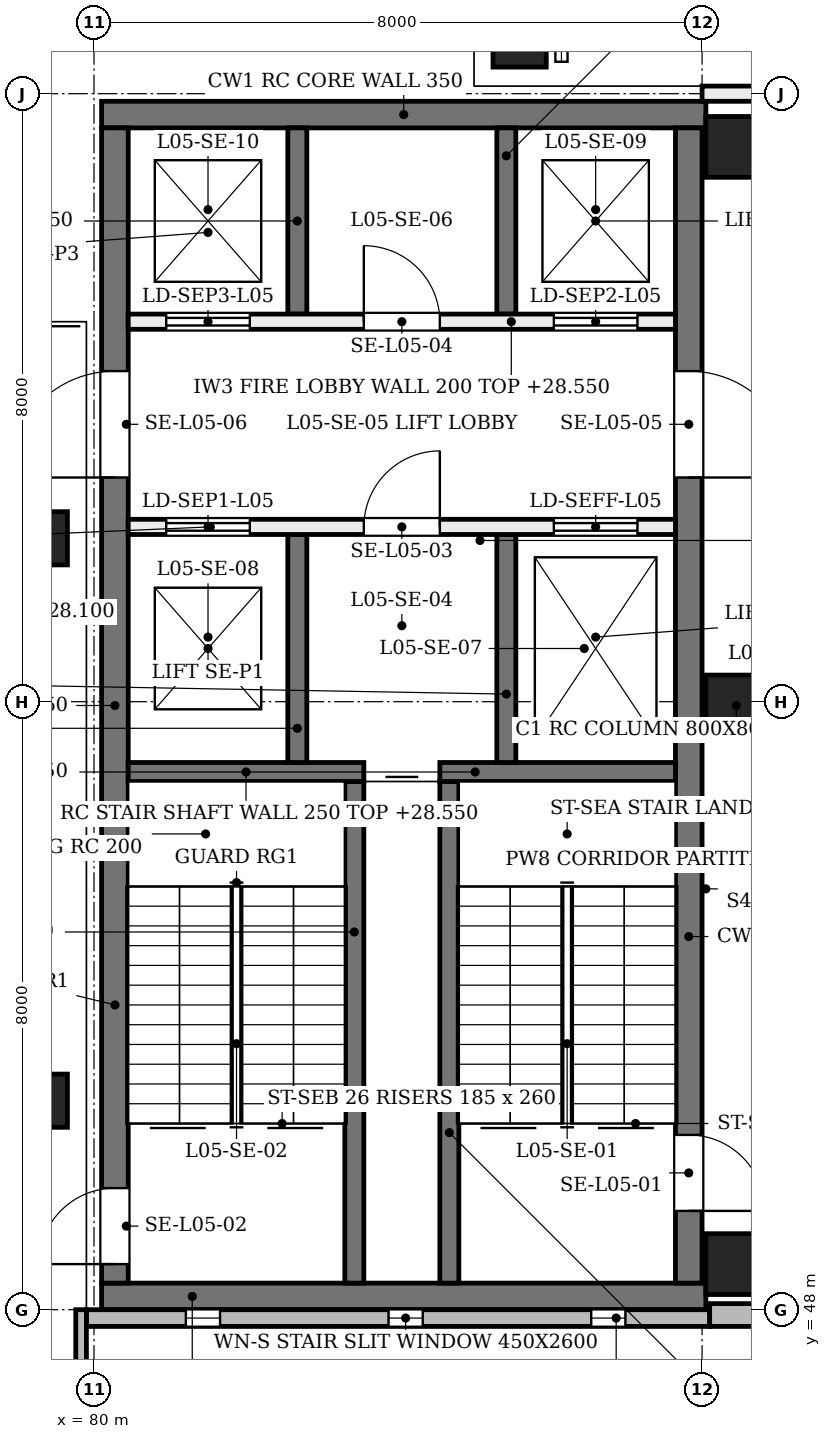
"""IFC4 building model, lengths in metres.
Left out: names, types, materials, properties, quantities, classifications, styles, units other than length and angle.
Written with IfcOpenShell. Run it as: python <this file> out.ifc"""

import sys

from ifc_helpers import new_model, si_unit, direction, frame, frame_2d, origin, origin_2d, place, context, subcontext, project, spatial, rectangle, extrude, element, fill, save


model = new_model("IFC4")
c1 = context("Model", 3, precision=1e-05, world=origin(), true_north=direction((0.0, 1.0)))
c2 = subcontext(c1, "Body", "Model", "MODEL_VIEW")
j1 = project(units=[si_unit("LENGTHUNIT", "METRE"), si_unit("PLANEANGLEUNIT", "RADIAN")], contexts=[c1])
p1 = place(None, origin())
s1 = spatial("IfcSite", under=j1, at=p1, CompositionType="ELEMENT")
p2 = place(p1, origin())
s2 = spatial("IfcBuilding", under=s1, at=p2, CompositionType="ELEMENT")
p3 = place(p2, frame((0.0, 0.0, 24.0)))
s3 = spatial("IfcBuildingStorey", under=s2, at=p3, CompositionType="ELEMENT", Elevation=24.0)
for number, where, z_axis, x_axis in (
    (1, (80.1, 48.175, 0.0), (0.0, 0.0, 1.0), (1.0, 0.0, 0.0)),
    (2, (80.1, 63.725, 0.0), (0.0, 0.0, 1.0), (1.0, 0.0, 0.0)),
):
    element("IfcWall", number, at=place(p3, frame(where, z_axis=z_axis, x_axis=x_axis)), inside=s3, PredefinedType="SHEAR", context=c2, shape_type="SweptSolid", body=[
        extrude(rectangle(XDim=7.95, YDim=0.35, at=frame_2d((3.975, 0.0))), origin(), (0.0, 0.0, 1.0), 4.58),
    ])
p4 = place(p3, frame((80.275, 48.35, 0.0), z_axis=(0.0, 0.0, 1.0), x_axis=(0.0, 1.0, 0.0)))
e3 = element("IfcWall", 3, at=p4, inside=s3, PredefinedType="SHEAR", context=c2, shape_type="SweptSolid", body=[
    extrude(rectangle(XDim=15.2, YDim=0.35, at=frame_2d((7.6, 0.0))), origin(), (0.0, 0.0, 1.0), 4.58),
])
p5 = place(p4, frame((0.25, 0.0, 0.0)))
e4 = element("IfcOpeningElement", 4, at=p5, cuts=e3, PredefinedType="OPENING", context=c2, shape_type="SweptSolid", body=[
    extrude(rectangle(XDim=1.0, YDim=2.1, at=frame_2d((0.5, 1.05))), frame((0.0, 0.185, 0.0), z_axis=(0.0, -1.0, 0.0), x_axis=(1.0, 0.0, 0.0)), (0.0, 0.0, 1.0), 0.37),
])
p6 = place(p4, frame((10.6, 0.0, 0.0)))
e5 = element("IfcOpeningElement", 5, at=p6, cuts=e3, PredefinedType="OPENING", context=c2, shape_type="SweptSolid", body=[
    extrude(rectangle(XDim=1.4, YDim=2.1, at=frame_2d((0.7, 1.05))), frame((0.0, 0.185, 0.0), z_axis=(0.0, -1.0, 0.0), x_axis=(1.0, 0.0, 0.0)), (0.0, 0.0, 1.0), 0.37),
])
p7 = place(p3, frame((87.825, 48.35, 0.0), z_axis=(0.0, 0.0, 1.0), x_axis=(0.0, 1.0, 0.0)))
e6 = element("IfcWall", 6, at=p7, inside=s3, PredefinedType="SHEAR", context=c2, shape_type="SweptSolid", body=[
    extrude(rectangle(XDim=15.2, YDim=0.35, at=frame_2d((7.6, 0.0))), origin(), (0.0, 0.0, 1.0), 4.58),
])
p8 = place(p7, frame((0.95, 0.0, 0.0)))
e7 = element("IfcOpeningElement", 7, at=p8, cuts=e6, PredefinedType="OPENING", context=c2, shape_type="SweptSolid", body=[
    extrude(rectangle(XDim=1.0, YDim=2.1, at=frame_2d((0.5, 1.05))), frame((0.0, 0.185, 0.0), z_axis=(0.0, -1.0, 0.0), x_axis=(1.0, 0.0, 0.0)), (0.0, 0.0, 1.0), 0.37),
])
p9 = place(p7, frame((10.6, 0.0, 0.0)))
e8 = element("IfcOpeningElement", 8, at=p9, cuts=e6, PredefinedType="OPENING", context=c2, shape_type="SweptSolid", body=[
    extrude(rectangle(XDim=1.4, YDim=2.1, at=frame_2d((0.7, 1.05))), frame((0.0, 0.185, 0.0), z_axis=(0.0, -1.0, 0.0), x_axis=(1.0, 0.0, 0.0)), (0.0, 0.0, 1.0), 0.37),
])
for number, where, z_axis, x_axis in (
    (9, (88.45, 48.6, 0.0), (0.0, 0.0, 1.0), (1.0, 0.0, 0.0)),
    (10, (88.45, 55.95, 0.0), (0.0, 0.0, 1.0), (1.0, 0.0, 0.0)),
    (11, (88.45, 63.3, 0.0), (0.0, 0.0, 1.0), (1.0, 0.0, 0.0)),
):
    element("IfcColumn", number, at=place(p3, frame(where, z_axis=z_axis, x_axis=x_axis)), inside=s3, PredefinedType="COLUMN", context=c2, shape_type="SweptSolid", body=[
        extrude(rectangle(XDim=0.8, YDim=0.8, at=origin_2d()), origin(), (0.0, 0.0, 1.0), 4.8),
    ])
for number, where, z_axis, x_axis in (
    (12, (79.3, 51.0, 0.0), (0.0, -0.204, 0.979), (1.0, 0.0, 0.0)),
    (13, (79.3, 58.4, 0.0), (0.0, -0.204, 0.979), (1.0, 0.0, 0.0)),
):
    element("IfcColumn", number, at=place(p3, frame(where, z_axis=z_axis, x_axis=x_axis)), inside=s3, PredefinedType="COLUMN", context=c2, shape_type="SweptSolid", body=[
        extrude(rectangle(XDim=0.7, YDim=0.7, at=origin_2d()), origin(), (0.0, 0.0, 1.0), 4.678),
    ])
p10 = place(p3, frame((85.6, 64.7, 0.0), z_axis=(0.0, 0.0, 1.0), x_axis=(1.0, 0.0, 0.0)))
e14 = element("IfcColumn", 14, at=p10, inside=s3, PredefinedType="COLUMN", context=c2, shape_type="SweptSolid", body=[
    extrude(rectangle(XDim=0.7, YDim=0.7, at=origin_2d()), origin(), (0.0, 0.0, 1.0), 4.58),
])
p11 = place(p3, frame((79.9, 47.89, 0.0), z_axis=(0.0, 0.0, 1.0), x_axis=(1.0, 0.0, 0.0)))
e15 = element("IfcWall", 15, at=p11, inside=s3, PredefinedType="SOLIDWALL", context=c2, shape_type="SweptSolid", body=[
    extrude(rectangle(XDim=8.2, YDim=0.22, at=frame_2d((4.1, 0.0))), origin(), (0.0, 0.0, 1.0), 3.9),
])
p12 = place(p11, frame((1.308, 0.0, 0.9)))
e16 = element("IfcOpeningElement", 16, at=p12, cuts=e15, PredefinedType="OPENING", context=c2, shape_type="SweptSolid", body=[
    extrude(rectangle(XDim=0.45, YDim=2.6, at=frame_2d((0.225, 1.3))), frame((0.0, 0.12, 0.0), z_axis=(0.0, -1.0, 0.0), x_axis=(1.0, 0.0, 0.0)), (0.0, 0.0, 1.0), 0.24),
])
p13 = place(p11, frame((3.975, 0.0, 0.9)))
e17 = element("IfcOpeningElement", 17, at=p13, cuts=e15, PredefinedType="OPENING", context=c2, shape_type="SweptSolid", body=[
    extrude(rectangle(XDim=0.45, YDim=2.6, at=frame_2d((0.225, 1.3))), frame((0.0, 0.12, 0.0), z_axis=(0.0, -1.0, 0.0), x_axis=(1.0, 0.0, 0.0)), (0.0, 0.0, 1.0), 0.24),
])
p14 = place(p11, frame((6.642, 0.0, 0.9)))
e18 = element("IfcOpeningElement", 18, at=p14, cuts=e15, PredefinedType="OPENING", context=c2, shape_type="SweptSolid", body=[
    extrude(rectangle(XDim=0.45, YDim=2.6, at=frame_2d((0.225, 1.3))), frame((0.0, 0.12, 0.0), z_axis=(0.0, -1.0, 0.0), x_axis=(1.0, 0.0, 0.0)), (0.0, 0.0, 1.0), 0.24),
])
p15 = place(p3, frame((88.1, 47.93, 0.0), z_axis=(0.0, 0.0, 1.0), x_axis=(1.0, 0.0, 0.0)))
e19 = element("IfcWall", 19, at=p15, inside=s3, PredefinedType="SOLIDWALL", context=c2, shape_type="SweptSolid", body=[
    extrude(rectangle(XDim=7.9, YDim=0.3, at=frame_2d((3.95, 0.0))), origin(), (0.0, 0.0, 1.0), 3.9),
])
p16 = place(p15, frame((0.717, 0.0, 0.75)))
e20 = element("IfcOpeningElement", 20, at=p16, cuts=e19, PredefinedType="OPENING", context=c2, shape_type="SweptSolid", body=[
    extrude(rectangle(XDim=1.2, YDim=3.1, at=frame_2d((0.6, 1.55))), frame((0.0, 0.16, 0.0), z_axis=(0.0, -1.0, 0.0), x_axis=(1.0, 0.0, 0.0)), (0.0, 0.0, 1.0), 0.32),
])
p17 = place(p15, frame((3.35, 0.0, 0.75)))
e21 = element("IfcOpeningElement", 21, at=p17, cuts=e19, PredefinedType="OPENING", context=c2, shape_type="SweptSolid", body=[
    extrude(rectangle(XDim=1.2, YDim=3.1, at=frame_2d((0.6, 1.55))), frame((0.0, 0.16, 0.0), z_axis=(0.0, -1.0, 0.0), x_axis=(1.0, 0.0, 0.0)), (0.0, 0.0, 1.0), 0.32),
])
p18 = place(p15, frame((5.983, 0.0, 0.75)))
e22 = element("IfcOpeningElement", 22, at=p18, cuts=e19, PredefinedType="OPENING", context=c2, shape_type="SweptSolid", body=[
    extrude(rectangle(XDim=1.2, YDim=3.1, at=frame_2d((0.6, 1.55))), frame((0.0, 0.16, 0.0), z_axis=(0.0, -1.0, 0.0), x_axis=(1.0, 0.0, 0.0)), (0.0, 0.0, 1.0), 0.32),
])
p19 = place(p3, frame((79.83, 43.0, 0.0), z_axis=(0.0, 0.0, 1.0), x_axis=(0.0, 1.0, 0.0)))
e23 = element("IfcWall", 23, at=p19, inside=s3, PredefinedType="SOLIDWALL", context=c2, shape_type="SweptSolid", body=[
    extrude(rectangle(XDim=5.0, YDim=0.14, at=frame_2d((2.5, 0.0))), origin(), (0.0, 0.0, 1.0), 3.9),
])
for number, where, z_axis, x_axis in (
    (24, (84.675, 48.35, 0.0), (0.0, 0.0, 1.0), (0.0, 1.0, 0.0)),
    (25, (83.425, 48.35, 0.0), (0.0, 0.0, 1.0), (0.0, 1.0, 0.0)),
):
    element("IfcWall", number, at=place(p3, frame(where, z_axis=z_axis, x_axis=x_axis)), inside=s3, PredefinedType="SOLIDWALL", context=c2, shape_type="SweptSolid", body=[
        extrude(rectangle(XDim=6.6, YDim=0.25, at=frame_2d((3.3, 0.0))), origin(), (0.0, 0.0, 1.0), 4.55),
    ])
p20 = place(p3, frame((87.65, 55.075, 0.0), z_axis=(0.0, 0.0, 1.0), x_axis=(-1.0, 0.0, 0.0)))
e26 = element("IfcWall", 26, at=p20, inside=s3, PredefinedType="SOLIDWALL", context=c2, shape_type="SweptSolid", body=[
    extrude(rectangle(XDim=3.1, YDim=0.25, at=frame_2d((1.55, 0.0))), origin(), (0.0, 0.0, 1.0), 4.55),
])
p21 = place(p3, frame((83.55, 55.075, 0.0), z_axis=(0.0, 0.0, 1.0), x_axis=(-1.0, 0.0, 0.0)))
e27 = element("IfcWall", 27, at=p21, inside=s3, PredefinedType="SOLIDWALL", context=c2, shape_type="SweptSolid", body=[
    extrude(rectangle(XDim=3.1, YDim=0.25, at=frame_2d((1.55, 0.0))), origin(), (0.0, 0.0, 1.0), 4.55),
])
p22 = place(p3, frame((85.425, 55.2, 0.0), z_axis=(0.0, 0.0, 1.0), x_axis=(0.0, 1.0, 0.0)))
e28 = element("IfcWall", 28, at=p22, inside=s3, PredefinedType="SOLIDWALL", context=c2, shape_type="SweptSolid", body=[
    extrude(rectangle(XDim=3.0, YDim=0.25, at=frame_2d((1.5, 0.0))), origin(), (0.0, 0.0, 1.0), 4.55),
])
p23 = place(p3, frame((85.425, 61.1, 0.0), z_axis=(0.0, 0.0, 1.0), x_axis=(0.0, 1.0, 0.0)))
e29 = element("IfcWall", 29, at=p23, inside=s3, PredefinedType="SOLIDWALL", context=c2, shape_type="SweptSolid", body=[
    extrude(rectangle(XDim=2.45, YDim=0.25, at=frame_2d((1.225, 0.0))), origin(), (0.0, 0.0, 1.0), 4.55),
])
p24 = place(p3, frame((82.675, 55.2, 0.0), z_axis=(0.0, 0.0, 1.0), x_axis=(0.0, 1.0, 0.0)))
e30 = element("IfcWall", 30, at=p24, inside=s3, PredefinedType="SOLIDWALL", context=c2, shape_type="SweptSolid", body=[
    extrude(rectangle(XDim=3.0, YDim=0.25, at=frame_2d((1.5, 0.0))), origin(), (0.0, 0.0, 1.0), 4.55),
])
p25 = place(p3, frame((82.675, 61.1, 0.0), z_axis=(0.0, 0.0, 1.0), x_axis=(0.0, 1.0, 0.0)))
e31 = element("IfcWall", 31, at=p25, inside=s3, PredefinedType="SOLIDWALL", context=c2, shape_type="SweptSolid", body=[
    extrude(rectangle(XDim=2.45, YDim=0.25, at=frame_2d((1.225, 0.0))), origin(), (0.0, 0.0, 1.0), 4.55),
])
p26 = place(p3, frame((87.65, 58.3, 0.0), z_axis=(0.0, 0.0, 1.0), x_axis=(-1.0, 0.0, 0.0)))
e32 = element("IfcWall", 32, at=p26, inside=s3, PredefinedType="SOLIDWALL", context=c2, shape_type="SweptSolid", body=[
    extrude(rectangle(XDim=7.2, YDim=0.2, at=frame_2d((3.6, 0.0))), origin(), (0.0, 0.0, 1.0), 4.55),
])
p27 = place(p26, frame((0.5, 0.0, 0.0)))
e33 = element("IfcOpeningElement", 33, at=p27, cuts=e32, PredefinedType="OPENING", context=c2, shape_type="SweptSolid", body=[
    extrude(rectangle(XDim=1.1, YDim=2.1, at=frame_2d((0.55, 1.05))), frame((0.0, 0.11, 0.0), z_axis=(0.0, -1.0, 0.0), x_axis=(1.0, 0.0, 0.0)), (0.0, 0.0, 1.0), 0.22),
])
p28 = place(p26, frame((5.6, 0.0, 0.0)))
e34 = element("IfcOpeningElement", 34, at=p28, cuts=e32, PredefinedType="OPENING", context=c2, shape_type="SweptSolid", body=[
    extrude(rectangle(XDim=1.1, YDim=2.1, at=frame_2d((0.55, 1.05))), frame((0.0, 0.11, 0.0), z_axis=(0.0, -1.0, 0.0), x_axis=(1.0, 0.0, 0.0)), (0.0, 0.0, 1.0), 0.22),
])
p29 = place(p26, frame((3.1, 0.0, 0.0)))
e35 = element("IfcOpeningElement", 35, at=p29, cuts=e32, PredefinedType="OPENING", context=c2, shape_type="SweptSolid", body=[
    extrude(rectangle(XDim=1.0, YDim=2.1, at=frame_2d((0.5, 1.05))), frame((0.0, 0.11, 0.0), z_axis=(0.0, -1.0, 0.0), x_axis=(1.0, 0.0, 0.0)), (0.0, 0.0, 1.0), 0.22),
])
p30 = place(p3, frame((87.65, 61.0, 0.0), z_axis=(0.0, 0.0, 1.0), x_axis=(-1.0, 0.0, 0.0)))
e36 = element("IfcWall", 36, at=p30, inside=s3, PredefinedType="SOLIDWALL", context=c2, shape_type="SweptSolid", body=[
    extrude(rectangle(XDim=7.2, YDim=0.2, at=frame_2d((3.6, 0.0))), origin(), (0.0, 0.0, 1.0), 4.55),
])
p31 = place(p30, frame((0.5, 0.0, 0.0)))
e37 = element("IfcOpeningElement", 37, at=p31, cuts=e36, PredefinedType="OPENING", context=c2, shape_type="SweptSolid", body=[
    extrude(rectangle(XDim=1.1, YDim=2.1, at=frame_2d((0.55, 1.05))), frame((0.0, 0.11, 0.0), z_axis=(0.0, -1.0, 0.0), x_axis=(1.0, 0.0, 0.0)), (0.0, 0.0, 1.0), 0.22),
])
p32 = place(p30, frame((5.6, 0.0, 0.0)))
e38 = element("IfcOpeningElement", 38, at=p32, cuts=e36, PredefinedType="OPENING", context=c2, shape_type="SweptSolid", body=[
    extrude(rectangle(XDim=1.1, YDim=2.1, at=frame_2d((0.55, 1.05))), frame((0.0, 0.11, 0.0), z_axis=(0.0, -1.0, 0.0), x_axis=(1.0, 0.0, 0.0)), (0.0, 0.0, 1.0), 0.22),
])
p33 = place(p30, frame((3.1, 0.0, 0.0)))
e39 = element("IfcOpeningElement", 39, at=p33, cuts=e36, PredefinedType="OPENING", context=c2, shape_type="SweptSolid", body=[
    extrude(rectangle(XDim=1.0, YDim=2.1, at=frame_2d((0.5, 1.05))), frame((0.0, 0.11, 0.0), z_axis=(0.0, -1.0, 0.0), x_axis=(1.0, 0.0, 0.0)), (0.0, 0.0, 1.0), 0.22),
])
p34 = place(p3, frame((88.0, 64.0, 0.0), z_axis=(0.0, 0.0, 1.0), x_axis=(1.0, 0.0, 0.0)))
e40 = element("IfcWall", 40, at=p34, inside=s3, PredefinedType="PARTITIONING", context=c2, shape_type="SweptSolid", body=[
    extrude(rectangle(XDim=3.6, YDim=0.2, at=frame_2d((1.8, 0.0))), origin(), (0.0, 0.0, 1.0), 3.88),
])
p35 = place(p34, frame((1.0, 0.0, 0.0)))
e41 = element("IfcOpeningElement", 41, at=p35, cuts=e40, PredefinedType="OPENING", context=c2, shape_type="SweptSolid", body=[
    extrude(rectangle(XDim=1.6, YDim=2.1, at=frame_2d((0.8, 1.05))), frame((0.0, 0.11, 0.0), z_axis=(0.0, -1.0, 0.0), x_axis=(1.0, 0.0, 0.0)), (0.0, 0.0, 1.0), 0.22),
])
p36 = place(p12, origin())
e42 = element("IfcWindow", 42, at=p36, inside=s3, PartitioningType="SINGLE_PANEL", PredefinedType="WINDOW", context=c2, shape_type="SweptSolid", body=[
    extrude(rectangle(XDim=0.45, YDim=2.6, at=frame_2d((0.225, 1.3))), frame((0.0, 0.03, 0.0), z_axis=(0.0, -1.0, 0.0), x_axis=(1.0, 0.0, 0.0)), (0.0, 0.0, 1.0), 0.06),
])
fill(e16, e42)
p37 = place(p13, origin())
e43 = element("IfcWindow", 43, at=p37, inside=s3, PartitioningType="SINGLE_PANEL", PredefinedType="WINDOW", context=c2, shape_type="SweptSolid", body=[
    extrude(rectangle(XDim=0.45, YDim=2.6, at=frame_2d((0.225, 1.3))), frame((0.0, 0.03, 0.0), z_axis=(0.0, -1.0, 0.0), x_axis=(1.0, 0.0, 0.0)), (0.0, 0.0, 1.0), 0.06),
])
fill(e17, e43)
p38 = place(p14, origin())
e44 = element("IfcWindow", 44, at=p38, inside=s3, PartitioningType="SINGLE_PANEL", PredefinedType="WINDOW", context=c2, shape_type="SweptSolid", body=[
    extrude(rectangle(XDim=0.45, YDim=2.6, at=frame_2d((0.225, 1.3))), frame((0.0, 0.03, 0.0), z_axis=(0.0, -1.0, 0.0), x_axis=(1.0, 0.0, 0.0)), (0.0, 0.0, 1.0), 0.06),
])
fill(e18, e44)
p39 = place(p8, frame((1.0, 0.0, 0.0), z_axis=(0.0, 0.0, 1.0), x_axis=(-1.0, 0.0, 0.0)))
e45 = element("IfcDoor", 45, at=p39, inside=s3, OperationType="SINGLE_SWING_LEFT", PredefinedType="DOOR", context=c2, shape_type="SweptSolid", body=[
    extrude(rectangle(XDim=1.0, YDim=2.1, at=frame_2d((0.5, 1.05))), frame((0.0, 0.025, 0.0), z_axis=(0.0, -1.0, 0.0), x_axis=(1.0, 0.0, 0.0)), (0.0, 0.0, 1.0), 0.05),
])
fill(e7, e45)
p40 = place(p5, origin())
e46 = element("IfcDoor", 46, at=p40, inside=s3, OperationType="SINGLE_SWING_LEFT", PredefinedType="DOOR", context=c2, shape_type="SweptSolid", body=[
    extrude(rectangle(XDim=1.0, YDim=2.1, at=frame_2d((0.5, 1.05))), frame((0.0, 0.025, 0.0), z_axis=(0.0, -1.0, 0.0), x_axis=(1.0, 0.0, 0.0)), (0.0, 0.0, 1.0), 0.05),
])
fill(e4, e46)
p41 = place(p27, frame((1.1, 0.0, 0.0), z_axis=(0.0, 0.0, 1.0), x_axis=(-1.0, 0.0, 0.0)))
e47 = element("IfcDoor", 47, at=p41, inside=s3, OperationType="DOUBLE_DOOR_SLIDING", PredefinedType="DOOR", context=c2, shape_type="SweptSolid", body=[
    extrude(rectangle(XDim=1.1, YDim=2.1, at=frame_2d((0.55, 1.05))), frame((0.0, 0.025, 0.0), z_axis=(0.0, -1.0, 0.0), x_axis=(1.0, 0.0, 0.0)), (0.0, 0.0, 1.0), 0.05),
])
fill(e33, e47)
p42 = place(p28, frame((1.1, 0.0, 0.0), z_axis=(0.0, 0.0, 1.0), x_axis=(-1.0, 0.0, 0.0)))
e48 = element("IfcDoor", 48, at=p42, inside=s3, OperationType="DOUBLE_DOOR_SLIDING", PredefinedType="DOOR", context=c2, shape_type="SweptSolid", body=[
    extrude(rectangle(XDim=1.1, YDim=2.1, at=frame_2d((0.55, 1.05))), frame((0.0, 0.025, 0.0), z_axis=(0.0, -1.0, 0.0), x_axis=(1.0, 0.0, 0.0)), (0.0, 0.0, 1.0), 0.05),
])
fill(e34, e48)
p43 = place(p31, origin())
e49 = element("IfcDoor", 49, at=p43, inside=s3, OperationType="DOUBLE_DOOR_SLIDING", PredefinedType="DOOR", context=c2, shape_type="SweptSolid", body=[
    extrude(rectangle(XDim=1.1, YDim=2.1, at=frame_2d((0.55, 1.05))), frame((0.0, 0.025, 0.0), z_axis=(0.0, -1.0, 0.0), x_axis=(1.0, 0.0, 0.0)), (0.0, 0.0, 1.0), 0.05),
])
fill(e37, e49)
p44 = place(p32, origin())
e50 = element("IfcDoor", 50, at=p44, inside=s3, OperationType="DOUBLE_DOOR_SLIDING", PredefinedType="DOOR", context=c2, shape_type="SweptSolid", body=[
    extrude(rectangle(XDim=1.1, YDim=2.1, at=frame_2d((0.55, 1.05))), frame((0.0, 0.025, 0.0), z_axis=(0.0, -1.0, 0.0), x_axis=(1.0, 0.0, 0.0)), (0.0, 0.0, 1.0), 0.05),
])
fill(e38, e50)
p45 = place(p29, frame((1.0, 0.0, 0.0), z_axis=(0.0, 0.0, 1.0), x_axis=(-1.0, 0.0, 0.0)))
e51 = element("IfcDoor", 51, at=p45, inside=s3, OperationType="SINGLE_SWING_LEFT", PredefinedType="DOOR", context=c2, shape_type="SweptSolid", body=[
    extrude(rectangle(XDim=1.0, YDim=2.1, at=frame_2d((0.5, 1.05))), frame((0.0, 0.025, 0.0), z_axis=(0.0, -1.0, 0.0), x_axis=(1.0, 0.0, 0.0)), (0.0, 0.0, 1.0), 0.05),
])
fill(e35, e51)
p46 = place(p33, origin())
e52 = element("IfcDoor", 52, at=p46, inside=s3, OperationType="SINGLE_SWING_RIGHT", PredefinedType="DOOR", context=c2, shape_type="SweptSolid", body=[
    extrude(rectangle(XDim=1.0, YDim=2.1, at=frame_2d((0.5, 1.05))), frame((0.0, 0.025, 0.0), z_axis=(0.0, -1.0, 0.0), x_axis=(1.0, 0.0, 0.0)), (0.0, 0.0, 1.0), 0.05),
])
fill(e39, e52)
p47 = place(p9, frame((1.4, 0.0, 0.0), z_axis=(0.0, 0.0, 1.0), x_axis=(-1.0, 0.0, 0.0)))
e53 = element("IfcDoor", 53, at=p47, inside=s3, OperationType="SINGLE_SWING_LEFT", PredefinedType="DOOR", context=c2, shape_type="SweptSolid", body=[
    extrude(rectangle(XDim=1.4, YDim=2.1, at=frame_2d((0.7, 1.05))), frame((0.0, 0.025, 0.0), z_axis=(0.0, -1.0, 0.0), x_axis=(1.0, 0.0, 0.0)), (0.0, 0.0, 1.0), 0.05),
])
fill(e8, e53)
p48 = place(p6, origin())
e54 = element("IfcDoor", 54, at=p48, inside=s3, OperationType="SINGLE_SWING_LEFT", PredefinedType="DOOR", context=c2, shape_type="SweptSolid", body=[
    extrude(rectangle(XDim=1.4, YDim=2.1, at=frame_2d((0.7, 1.05))), frame((0.0, 0.025, 0.0), z_axis=(0.0, -1.0, 0.0), x_axis=(1.0, 0.0, 0.0)), (0.0, 0.0, 1.0), 0.05),
])
fill(e5, e54)
save(model, sys.argv[1])
